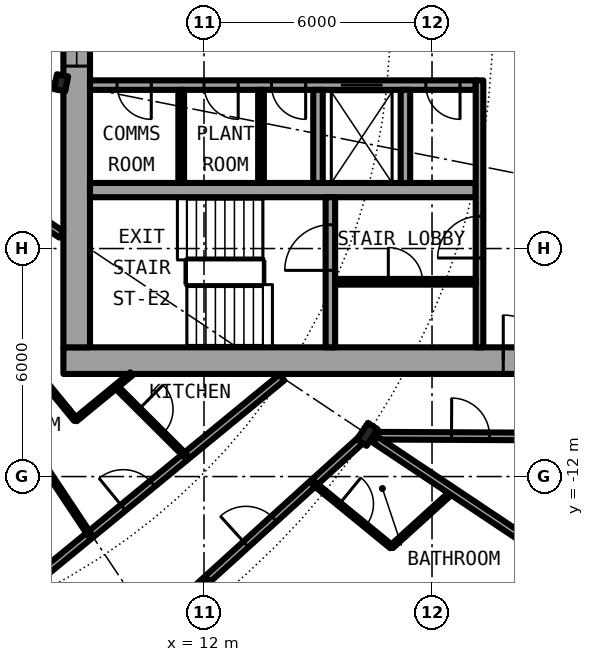
"""IFC4 building model, lengths in metres.
Left out: names, types, materials, properties, quantities, classifications, styles, units other than length and angle.
Written with IfcOpenShell. Run it as: python <this file> out.ifc"""

import sys

from ifc_helpers import new_model, si_unit, direction, frame, frame_2d, origin, origin_2d, place, context, subcontext, project, spatial, rectangle, i_section, extrude, element, fill, save


model = new_model("IFC4")
c1 = context("Model", 3, precision=1e-05, world=origin(), true_north=direction((0.0, 1.0)))
c2 = subcontext(c1, "Body", "Model", "MODEL_VIEW")
j1 = project(units=[si_unit("LENGTHUNIT", "METRE"), si_unit("PLANEANGLEUNIT", "RADIAN")], contexts=[c1])
p1 = place(None, origin())
s1 = spatial("IfcSite", under=j1, at=p1, CompositionType="ELEMENT")
p2 = place(p1, origin())
s2 = spatial("IfcBuilding", under=s1, at=p2, CompositionType="ELEMENT")
p3 = place(p2, frame((0.0, 0.0, 81.9)))
s3 = spatial("IfcBuildingStorey", under=s2, at=p3, CompositionType="ELEMENT", Elevation=81.9)
p4 = place(p3, frame((16.297, -10.889, 0.0), z_axis=(0.0, 0.0, 1.0), x_axis=(0.831469612303, -0.55557023302, 0.0)))
e1 = element("IfcColumn", 1, at=p4, inside=s3, PredefinedType="COLUMN", context=c2, shape_type="SweptSolid", body=[
    extrude(i_section(OverallWidth=0.306, OverallDepth=0.524, WebThickness=0.021, FlangeThickness=0.04, FilletRadius=0.027, at=origin_2d()), origin(), (0.0, 0.0, 1.0), 3.05),
])
p5 = place(p3, frame((8.239, -1.639, 0.0), z_axis=(0.0, 0.0, 1.0), x_axis=(0.980785280403, -0.195090322016, 0.0)))
e2 = element("IfcColumn", 2, at=p5, inside=s3, PredefinedType="COLUMN", context=c2, shape_type="SweptSolid", body=[
    extrude(i_section(OverallWidth=0.3, OverallDepth=0.4, WebThickness=0.013, FlangeThickness=0.024, FilletRadius=0.027, at=origin_2d()), origin(), (0.0, 0.0, 1.0), 3.05),
])
p6 = place(p3, frame((8.3, -8.95, 0.0), z_axis=(0.0, 0.0, 1.0), x_axis=(1.0, 0.0, 0.0)))
e3 = element("IfcWall", 3, at=p6, inside=s3, PredefinedType="SHEAR", context=c2, shape_type="SweptSolid", body=[
    extrude(rectangle(XDim=14.0, YDim=0.7, at=frame_2d((7.0, 0.0))), origin(), (0.0, 0.0, 1.0), 3.05),
])
p7 = place(p6, frame((11.575, 0.0, 0.0)))
e4 = element("IfcOpeningElement", 4, at=p7, cuts=e3, PredefinedType="OPENING", context=c2, shape_type="SweptSolid", body=[
    extrude(rectangle(XDim=1.2, YDim=2.3, at=frame_2d((0.6, 1.15))), frame((0.0, 0.36, 0.0), z_axis=(0.0, -1.0, 0.0), x_axis=(1.0, 0.0, 0.0)), (0.0, 0.0, 1.0), 0.72),
])
p8 = place(p3, frame((8.65, -8.6, 0.0), z_axis=(0.0, 0.0, 1.0), x_axis=(0.0, 1.0, 0.0)))
e5 = element("IfcWall", 5, at=p8, inside=s3, PredefinedType="SHEAR", context=c2, shape_type="SweptSolid", body=[
    extrude(rectangle(XDim=17.2, YDim=0.7, at=frame_2d((8.6, 0.0))), origin(), (0.0, 0.0, 1.0), 3.05),
])
p9 = place(p8, frame((7.4, 0.0, 0.1)))
e6 = element("IfcOpeningElement", 6, at=p9, cuts=e5, PredefinedType="OPENING", context=c2, shape_type="SweptSolid", body=[
    extrude(rectangle(XDim=2.4, YDim=2.2, at=frame_2d((1.2, 1.1))), frame((0.0, 0.36, 0.0), z_axis=(0.0, -1.0, 0.0), x_axis=(1.0, 0.0, 0.0)), (0.0, 0.0, 1.0), 0.72),
])
p10 = place(p3, frame((19.15, -1.7, 0.0), z_axis=(0.0, 0.0, 1.0), x_axis=(-1.0, 0.0, 0.0)))
e7 = element("IfcWall", 7, at=p10, inside=s3, PredefinedType="SHEAR", context=c2, shape_type="SweptSolid", body=[
    extrude(rectangle(XDim=10.15, YDim=0.25, at=frame_2d((5.075, 0.0))), origin(), (0.0, 0.0, 1.0), 3.05),
])
p11 = place(p10, frame((2.45, 0.0, 0.0)))
e8 = element("IfcOpeningElement", 8, at=p11, cuts=e7, PredefinedType="OPENING", context=c2, shape_type="SweptSolid", body=[
    extrude(rectangle(XDim=1.1, YDim=2.3, at=frame_2d((0.55, 1.15))), frame((0.0, 0.135, 0.0), z_axis=(0.0, -1.0, 0.0), x_axis=(1.0, 0.0, 0.0)), (0.0, 0.0, 1.0), 0.27),
])
p12 = place(p10, frame((8.538, 0.0, 0.0)))
e9 = element("IfcOpeningElement", 9, at=p12, cuts=e7, PredefinedType="OPENING", context=c2, shape_type="SweptSolid", body=[
    extrude(rectangle(XDim=0.9, YDim=2.3, at=frame_2d((0.45, 1.15))), frame((0.0, 0.135, 0.0), z_axis=(0.0, -1.0, 0.0), x_axis=(1.0, 0.0, 0.0)), (0.0, 0.0, 1.0), 0.27),
])
p13 = place(p10, frame((6.25, 0.0, 0.0)))
e10 = element("IfcOpeningElement", 10, at=p13, cuts=e7, PredefinedType="OPENING", context=c2, shape_type="SweptSolid", body=[
    extrude(rectangle(XDim=0.9, YDim=2.3, at=frame_2d((0.45, 1.15))), frame((0.0, 0.135, 0.0), z_axis=(0.0, -1.0, 0.0), x_axis=(1.0, 0.0, 0.0)), (0.0, 0.0, 1.0), 0.27),
])
p14 = place(p10, frame((4.475, 0.0, 0.0)))
e11 = element("IfcOpeningElement", 11, at=p14, cuts=e7, PredefinedType="OPENING", context=c2, shape_type="SweptSolid", body=[
    extrude(rectangle(XDim=0.9, YDim=2.3, at=frame_2d((0.45, 1.15))), frame((0.0, 0.135, 0.0), z_axis=(0.0, -1.0, 0.0), x_axis=(1.0, 0.0, 0.0)), (0.0, 0.0, 1.0), 0.27),
])
p15 = place(p10, frame((0.413, 0.0, 0.0)))
e12 = element("IfcOpeningElement", 12, at=p15, cuts=e7, PredefinedType="OPENING", context=c2, shape_type="SweptSolid", body=[
    extrude(rectangle(XDim=0.9, YDim=2.3, at=frame_2d((0.45, 1.15))), frame((0.0, 0.135, 0.0), z_axis=(0.0, -1.0, 0.0), x_axis=(1.0, 0.0, 0.0)), (0.0, 0.0, 1.0), 0.27),
])
p16 = place(p3, frame((9.0, -4.462, 0.0), z_axis=(0.0, 0.0, 1.0), x_axis=(1.0, 0.0, 0.0)))
e13 = element("IfcWall", 13, at=p16, inside=s3, PredefinedType="SHEAR", context=c2, shape_type="SweptSolid", body=[
    extrude(rectangle(XDim=10.15, YDim=0.375, at=frame_2d((5.075, 0.0))), origin(), (0.0, 0.0, 1.0), 3.05),
])
p17 = place(p3, frame((15.325, -8.6, 0.0), z_axis=(0.0, 0.0, 1.0), x_axis=(0.0, 1.0, 0.0)))
e14 = element("IfcWall", 14, at=p17, inside=s3, PredefinedType="SHEAR", context=c2, shape_type="SweptSolid", body=[
    extrude(rectangle(XDim=3.95, YDim=0.25, at=frame_2d((1.975, 0.0))), origin(), (0.0, 0.0, 1.0), 3.05),
])
p18 = place(p17, frame((2.025, 0.0, 0.0)))
e15 = element("IfcOpeningElement", 15, at=p18, cuts=e14, PredefinedType="OPENING", context=c2, shape_type="SweptSolid", body=[
    extrude(rectangle(XDim=1.2, YDim=2.3, at=frame_2d((0.6, 1.15))), frame((0.0, 0.135, 0.0), z_axis=(0.0, -1.0, 0.0), x_axis=(1.0, 0.0, 0.0)), (0.0, 0.0, 1.0), 0.27),
])
for number, where, z_axis, x_axis in (
    (16, (15.0, -1.825, 0.0), (0.0, 0.0, 1.0), (0.0, -1.0, 0.0)),
    (17, (17.3, -1.825, 0.0), (0.0, 0.0, 1.0), (0.0, -1.0, 0.0)),
):
    element("IfcWall", number, at=place(p3, frame(where, z_axis=z_axis, x_axis=x_axis)), inside=s3, PredefinedType="SOLIDWALL", context=c2, shape_type="SweptSolid", body=[
        extrude(rectangle(XDim=2.45, YDim=0.25, at=frame_2d((1.225, 0.0))), origin(), (0.0, 0.0, 1.0), 2.7),
    ])
p19 = place(p3, frame((19.25, -8.6, 0.0), z_axis=(0.0, 0.0, 1.0), x_axis=(0.0, 1.0, 0.0)))
e18 = element("IfcWall", 18, at=p19, inside=s3, PredefinedType="SOLIDWALL", context=c2, shape_type="SweptSolid", body=[
    extrude(rectangle(XDim=7.025, YDim=0.2, at=frame_2d((3.513, 0.0))), origin(), (0.0, 0.0, 1.0), 2.7),
])
p20 = place(p19, frame((2.35, 0.0, 0.0)))
e19 = element("IfcOpeningElement", 19, at=p20, cuts=e18, PredefinedType="OPENING", context=c2, shape_type="SweptSolid", body=[
    extrude(rectangle(XDim=1.1, YDim=2.3, at=frame_2d((0.55, 1.15))), frame((0.0, 0.11, 0.0), z_axis=(0.0, -1.0, 0.0), x_axis=(1.0, 0.0, 0.0)), (0.0, 0.0, 1.0), 0.22),
])
for number, where, z_axis, x_axis in (
    (20, (11.4, -1.825, 0.0), (0.0, 0.0, 1.0), (0.0, -1.0, 0.0)),
    (21, (13.5, -1.825, 0.0), (0.0, 0.0, 1.0), (0.0, -1.0, 0.0)),
):
    element("IfcWall", number, at=place(p3, frame(where, z_axis=z_axis, x_axis=x_axis)), inside=s3, PredefinedType="PARTITIONING", context=c2, shape_type="SweptSolid", body=[
        extrude(rectangle(XDim=2.45, YDim=0.15, at=frame_2d((1.225, 0.0))), origin(), (0.0, 0.0, 1.0), 2.7),
    ])
p21 = place(p3, frame((15.45, -6.875, 0.0), z_axis=(0.0, 0.0, 1.0), x_axis=(1.0, 0.0, 0.0)))
e22 = element("IfcWall", 22, at=p21, inside=s3, PredefinedType="PARTITIONING", context=c2, shape_type="SweptSolid", body=[
    extrude(rectangle(XDim=3.7, YDim=0.15, at=frame_2d((1.85, 0.0))), origin(), (0.0, 0.0, 1.0), 2.7),
])
p22 = place(p21, frame((1.4, 0.0, 0.0)))
e23 = element("IfcOpeningElement", 23, at=p22, cuts=e22, PredefinedType="OPENING", context=c2, shape_type="SweptSolid", body=[
    extrude(rectangle(XDim=0.9, YDim=2.3, at=frame_2d((0.45, 1.15))), frame((0.0, 0.085, 0.0), z_axis=(0.0, -1.0, 0.0), x_axis=(1.0, 0.0, 0.0)), (0.0, 0.0, 1.0), 0.17),
])
p23 = place(p3, frame((16.936, -13.845, 0.0), z_axis=(0.0, 0.0, 1.0), x_axis=(0.740836325503, 0.671685595212, 0.0)))
e24 = element("IfcWall", 24, at=p23, inside=s3, PredefinedType="PARTITIONING", context=c2, shape_type="SweptSolid", body=[
    extrude(rectangle(XDim=2.168, YDim=0.1, at=frame_2d((1.084, 0.0))), origin(), (0.0, 0.0, 1.0), 2.7),
])
p24 = place(p3, frame((9.239, -17.286, 0.0), z_axis=(0.0, 0.0, 1.0), x_axis=(0.740909940942, 0.671604392044, 0.0)))
e25 = element("IfcWall", 25, at=p24, inside=s3, PredefinedType="PARTITIONING", context=c2, shape_type="SweptSolid", body=[
    extrude(rectangle(XDim=9.367, YDim=0.2, at=frame_2d((4.683, 0.0))), origin(), (0.0, 0.0, 1.0), 2.38),
])
p25 = place(p24, frame((5.215, 0.0, 0.0)))
e26 = element("IfcOpeningElement", 26, at=p25, cuts=e25, PredefinedType="OPENING", context=c2, shape_type="SweptSolid", body=[
    extrude(rectangle(XDim=1.0, YDim=2.3, at=frame_2d((0.5, 1.15))), frame((0.0, 0.11, 0.0), z_axis=(0.0, -1.0, 0.0), x_axis=(1.0, 0.0, 0.0)), (0.0, 0.0, 1.0), 0.22),
])
p26 = place(p3, frame((6.467, -15.614, 0.0), z_axis=(0.0, 0.0, 1.0), x_axis=(0.773074935257, 0.634314704605, 0.0)))
e27 = element("IfcWall", 27, at=p26, inside=s3, PredefinedType="PARTITIONING", context=c2, shape_type="SweptSolid", body=[
    extrude(rectangle(XDim=9.809, YDim=0.2, at=frame_2d((4.904, 0.0))), origin(), (0.0, 0.0, 1.0), 2.7),
])
p27 = place(p26, frame((4.407, 0.0, 0.0)))
e28 = element("IfcOpeningElement", 28, at=p27, cuts=e27, PredefinedType="OPENING", context=c2, shape_type="SweptSolid", body=[
    extrude(rectangle(XDim=1.0, YDim=2.3, at=frame_2d((0.5, 1.15))), frame((0.0, 0.11, 0.0), z_axis=(0.0, -1.0, 0.0), x_axis=(1.0, 0.0, 0.0)), (0.0, 0.0, 1.0), 0.22),
])
p28 = place(p3, frame((8.62, -10.505, 0.0), z_axis=(0.0, 0.0, 1.0), x_axis=(0.772957368531, 0.6344579627, 0.0)))
e29 = element("IfcWall", 29, at=p28, inside=s3, PredefinedType="PARTITIONING", context=c2, shape_type="SweptSolid", body=[
    extrude(rectangle(XDim=1.906, YDim=0.1, at=frame_2d((0.953, 0.0))), origin(), (0.0, 0.0, 1.0), 2.7),
])
p29 = place(p3, frame((16.588, -10.925, 0.0), z_axis=(0.0, 0.0, 1.0), x_axis=(0.999988019025, -0.004895079807, 0.0)))
e30 = element("IfcWall", 30, at=p29, inside=s3, PredefinedType="PARTITIONING", context=c2, shape_type="SweptSolid", body=[
    extrude(rectangle(XDim=5.087, YDim=0.2, at=frame_2d((2.543, 0.0))), origin(), (0.0, 0.0, 1.0), 2.7),
])
p30 = place(p29, frame((1.925, 0.0, 0.0)))
e31 = element("IfcOpeningElement", 31, at=p30, cuts=e30, PredefinedType="OPENING", context=c2, shape_type="SweptSolid", body=[
    extrude(rectangle(XDim=1.0, YDim=2.3, at=frame_2d((0.5, 1.15))), frame((0.0, 0.11, 0.0), z_axis=(0.0, -1.0, 0.0), x_axis=(1.0, 0.0, 0.0)), (0.0, 0.0, 1.0), 0.22),
])
p31 = place(p3, frame((6.513, -4.472, 0.0), z_axis=(0.0, 0.0, 1.0), x_axis=(0.831382204863, -0.555701025225, 0.0)))
e32 = element("IfcWall", 32, at=p31, inside=s3, PredefinedType="PARTITIONING", context=c2, shape_type="SweptSolid", body=[
    extrude(rectangle(XDim=2.082, YDim=0.2, at=frame_2d((1.041, 0.0))), origin(), (0.0, 0.0, 1.0), 2.7),
])
p32 = place(p3, frame((4.898, -5.968, 0.0), z_axis=(0.0, 0.0, 1.0), x_axis=(0.634358693064, -0.773038840249, 0.0)))
e33 = element("IfcWall", 33, at=p32, inside=s3, PredefinedType="PARTITIONING", context=c2, shape_type="SweptSolid", body=[
    extrude(rectangle(XDim=5.868, YDim=0.1, at=frame_2d((2.934, 0.0))), origin(), (0.0, 0.0, 1.0), 2.7),
])
p33 = place(p32, frame((2.484, 0.0, 0.0)))
e34 = element("IfcOpeningElement", 34, at=p33, cuts=e33, PredefinedType="OPENING", context=c2, shape_type="SweptSolid", body=[
    extrude(rectangle(XDim=0.9, YDim=2.3, at=frame_2d((0.45, 1.15))), frame((0.0, 0.06, 0.0), z_axis=(0.0, -1.0, 0.0), x_axis=(1.0, 0.0, 0.0)), (0.0, 0.0, 1.0), 0.12),
])
p34 = place(p3, frame((7.558, -11.376, 0.0), z_axis=(0.0, 0.0, 1.0), x_axis=(0.553615197403, -0.83277260594, 0.0)))
e35 = element("IfcWall", 35, at=p34, inside=s3, PredefinedType="PARTITIONING", context=c2, shape_type="SweptSolid", body=[
    extrude(rectangle(XDim=2.597, YDim=0.1, at=frame_2d((1.299, 0.0))), origin(), (0.0, 0.0, 1.0), 2.7),
])
p35 = place(p3, frame((9.683, -9.632, 0.0), z_axis=(0.0, 0.0, 1.0), x_axis=(0.708796844581, -0.705412668665, 0.0)))
e36 = element("IfcWall", 36, at=p35, inside=s3, PredefinedType="PARTITIONING", context=c2, shape_type="SweptSolid", body=[
    extrude(rectangle(XDim=2.597, YDim=0.1, at=frame_2d((1.299, 0.0))), origin(), (0.0, 0.0, 1.0), 2.7),
])
p36 = place(p35, frame((0.849, 0.0, 0.0)))
e37 = element("IfcOpeningElement", 37, at=p36, cuts=e36, PredefinedType="OPENING", context=c2, shape_type="SweptSolid", body=[
    extrude(rectangle(XDim=0.9, YDim=2.3, at=frame_2d((0.45, 1.15))), frame((0.0, 0.06, 0.0), z_axis=(0.0, -1.0, 0.0), x_axis=(1.0, 0.0, 0.0)), (0.0, 0.0, 1.0), 0.12),
])
p37 = place(p3, frame((12.062, -14.727, 0.0), z_axis=(0.0, 0.0, 1.0), x_axis=(0.633664062855, -0.773608334654, 0.0)))
e38 = element("IfcWall", 38, at=p37, inside=s3, PredefinedType="PARTITIONING", context=c2, shape_type="SweptSolid", body=[
    extrude(rectangle(XDim=8.138, YDim=0.1, at=frame_2d((4.069, 0.0))), origin(), (0.0, 0.0, 1.0), 2.7),
])
p38 = place(p37, frame((0.861, 0.0, 0.0)))
e39 = element("IfcOpeningElement", 39, at=p38, cuts=e38, PredefinedType="OPENING", context=c2, shape_type="SweptSolid", body=[
    extrude(rectangle(XDim=0.9, YDim=2.3, at=frame_2d((0.45, 1.15))), frame((0.0, 0.06, 0.0), z_axis=(0.0, -1.0, 0.0), x_axis=(1.0, 0.0, 0.0)), (0.0, 0.0, 1.0), 0.12),
])
p39 = place(p37, frame((4.931, 0.0, 0.0)))
e40 = element("IfcOpeningElement", 40, at=p39, cuts=e38, PredefinedType="OPENING", context=c2, shape_type="SweptSolid", body=[
    extrude(rectangle(XDim=0.9, YDim=2.3, at=frame_2d((0.45, 1.15))), frame((0.0, 0.06, 0.0), z_axis=(0.0, -1.0, 0.0), x_axis=(1.0, 0.0, 0.0)), (0.0, 0.0, 1.0), 0.12),
])
p40 = place(p3, frame((14.882, -12.171, 0.0), z_axis=(0.0, 0.0, 1.0), x_axis=(0.774162545943, -0.632986850147, 0.0)))
e41 = element("IfcWall", 41, at=p40, inside=s3, PredefinedType="PARTITIONING", context=c2, shape_type="SweptSolid", body=[
    extrude(rectangle(XDim=2.649, YDim=0.1, at=frame_2d((1.325, 0.0))), origin(), (0.0, 0.0, 1.0), 2.7),
])
p41 = place(p40, frame((0.875, 0.0, 0.0)))
e42 = element("IfcOpeningElement", 42, at=p41, cuts=e41, PredefinedType="OPENING", context=c2, shape_type="SweptSolid", body=[
    extrude(rectangle(XDim=0.9, YDim=2.3, at=frame_2d((0.45, 1.15))), frame((0.0, 0.06, 0.0), z_axis=(0.0, -1.0, 0.0), x_axis=(1.0, 0.0, 0.0)), (0.0, 0.0, 1.0), 0.12),
])
p42 = place(p3, frame((16.515, -11.035, 0.0), z_axis=(0.0, 0.0, 1.0), x_axis=(0.831505405283, -0.555516661303, 0.0)))
e43 = element("IfcWall", 43, at=p42, inside=s3, PredefinedType="PARTITIONING", context=c2, shape_type="SweptSolid", body=[
    extrude(rectangle(XDim=7.312, YDim=0.2, at=frame_2d((3.656, 0.0))), origin(), (0.0, 0.0, 1.0), 2.7),
])
p43 = place(p11, origin())
e44 = element("IfcDoor", 44, at=p43, inside=s3, OperationType="DOUBLE_DOOR_SLIDING", PredefinedType="DOOR", context=c2, shape_type="SweptSolid", body=[
    extrude(rectangle(XDim=1.1, YDim=2.3, at=frame_2d((0.55, 1.15))), frame((0.0, 0.025, 0.0), z_axis=(0.0, -1.0, 0.0), x_axis=(1.0, 0.0, 0.0)), (0.0, 0.0, 1.0), 0.05),
])
fill(e8, e44)
p44 = place(p12, origin())
e45 = element("IfcDoor", 45, at=p44, inside=s3, OperationType="SINGLE_SWING_LEFT", PredefinedType="DOOR", context=c2, shape_type="SweptSolid", body=[
    extrude(rectangle(XDim=0.9, YDim=2.3, at=frame_2d((0.45, 1.15))), frame((0.0, 0.025, 0.0), z_axis=(0.0, -1.0, 0.0), x_axis=(1.0, 0.0, 0.0)), (0.0, 0.0, 1.0), 0.05),
])
fill(e9, e45)
p45 = place(p13, origin())
e46 = element("IfcDoor", 46, at=p45, inside=s3, OperationType="SINGLE_SWING_LEFT", PredefinedType="DOOR", context=c2, shape_type="SweptSolid", body=[
    extrude(rectangle(XDim=0.9, YDim=2.3, at=frame_2d((0.45, 1.15))), frame((0.0, 0.025, 0.0), z_axis=(0.0, -1.0, 0.0), x_axis=(1.0, 0.0, 0.0)), (0.0, 0.0, 1.0), 0.05),
])
fill(e10, e46)
p46 = place(p14, origin())
e47 = element("IfcDoor", 47, at=p46, inside=s3, OperationType="SINGLE_SWING_RIGHT", PredefinedType="DOOR", context=c2, shape_type="SweptSolid", body=[
    extrude(rectangle(XDim=0.9, YDim=2.3, at=frame_2d((0.45, 1.15))), frame((0.0, 0.025, 0.0), z_axis=(0.0, -1.0, 0.0), x_axis=(1.0, 0.0, 0.0)), (0.0, 0.0, 1.0), 0.05),
])
fill(e11, e47)
p47 = place(p15, origin())
e48 = element("IfcDoor", 48, at=p47, inside=s3, OperationType="SINGLE_SWING_RIGHT", PredefinedType="DOOR", context=c2, shape_type="SweptSolid", body=[
    extrude(rectangle(XDim=0.9, YDim=2.3, at=frame_2d((0.45, 1.15))), frame((0.0, 0.025, 0.0), z_axis=(0.0, -1.0, 0.0), x_axis=(1.0, 0.0, 0.0)), (0.0, 0.0, 1.0), 0.05),
])
fill(e12, e48)
p48 = place(p22, origin())
e49 = element("IfcDoor", 49, at=p48, inside=s3, OperationType="SINGLE_SWING_LEFT", PredefinedType="DOOR", context=c2, shape_type="SweptSolid", body=[
    extrude(rectangle(XDim=0.9, YDim=2.3, at=frame_2d((0.45, 1.15))), frame((0.0, 0.025, 0.0), z_axis=(0.0, -1.0, 0.0), x_axis=(1.0, 0.0, 0.0)), (0.0, 0.0, 1.0), 0.05),
])
fill(e23, e49)
p49 = place(p18, origin())
e50 = element("IfcDoor", 50, at=p49, inside=s3, OperationType="SINGLE_SWING_LEFT", PredefinedType="DOOR", context=c2, shape_type="SweptSolid", body=[
    extrude(rectangle(XDim=1.2, YDim=2.3, at=frame_2d((0.6, 1.15))), frame((0.0, 0.025, 0.0), z_axis=(0.0, -1.0, 0.0), x_axis=(1.0, 0.0, 0.0)), (0.0, 0.0, 1.0), 0.05),
])
fill(e15, e50)
p50 = place(p20, origin())
e51 = element("IfcDoor", 51, at=p50, inside=s3, OperationType="SINGLE_SWING_RIGHT", PredefinedType="DOOR", context=c2, shape_type="SweptSolid", body=[
    extrude(rectangle(XDim=1.1, YDim=2.3, at=frame_2d((0.55, 1.15))), frame((0.0, 0.025, 0.0), z_axis=(0.0, -1.0, 0.0), x_axis=(1.0, 0.0, 0.0)), (0.0, 0.0, 1.0), 0.05),
])
fill(e19, e51)
p51 = place(p7, origin())
e52 = element("IfcDoor", 52, at=p51, inside=s3, OperationType="SINGLE_SWING_LEFT", PredefinedType="DOOR", context=c2, shape_type="SweptSolid", body=[
    extrude(rectangle(XDim=1.2, YDim=2.3, at=frame_2d((0.6, 1.15))), frame((0.0, 0.025, 0.0), z_axis=(0.0, -1.0, 0.0), x_axis=(1.0, 0.0, 0.0)), (0.0, 0.0, 1.0), 0.05),
])
fill(e4, e52)
p52 = place(p9, origin())
e53 = element("IfcWindow", 53, at=p52, inside=s3, PartitioningType="SINGLE_PANEL", PredefinedType="WINDOW", context=c2, shape_type="SweptSolid", body=[
    extrude(rectangle(XDim=2.4, YDim=2.2, at=frame_2d((1.2, 1.1))), frame((0.0, 0.03, 0.0), z_axis=(0.0, -1.0, 0.0), x_axis=(1.0, 0.0, 0.0)), (0.0, 0.0, 1.0), 0.06),
])
fill(e6, e53)
p53 = place(p25, origin())
e54 = element("IfcDoor", 54, at=p53, inside=s3, OperationType="SINGLE_SWING_RIGHT", PredefinedType="DOOR", context=c2, shape_type="SweptSolid", body=[
    extrude(rectangle(XDim=1.0, YDim=2.3, at=frame_2d((0.5, 1.15))), frame((0.0, 0.025, 0.0), z_axis=(0.0, -1.0, 0.0), x_axis=(1.0, 0.0, 0.0)), (0.0, 0.0, 1.0), 0.05),
])
fill(e26, e54)
p54 = place(p41, origin())
e55 = element("IfcDoor", 55, at=p54, inside=s3, OperationType="SINGLE_SWING_RIGHT", PredefinedType="DOOR", context=c2, shape_type="SweptSolid", body=[
    extrude(rectangle(XDim=0.9, YDim=2.3, at=frame_2d((0.45, 1.15))), frame((0.0, 0.025, 0.0), z_axis=(0.0, -1.0, 0.0), x_axis=(1.0, 0.0, 0.0)), (0.0, 0.0, 1.0), 0.05),
])
fill(e42, e55)
p55 = place(p27, origin())
e56 = element("IfcDoor", 56, at=p55, inside=s3, OperationType="SINGLE_SWING_RIGHT", PredefinedType="DOOR", context=c2, shape_type="SweptSolid", body=[
    extrude(rectangle(XDim=1.0, YDim=2.3, at=frame_2d((0.5, 1.15))), frame((0.0, 0.025, 0.0), z_axis=(0.0, -1.0, 0.0), x_axis=(1.0, 0.0, 0.0)), (0.0, 0.0, 1.0), 0.05),
])
fill(e28, e56)
p56 = place(p36, origin())
e57 = element("IfcDoor", 57, at=p56, inside=s3, OperationType="SINGLE_SWING_RIGHT", PredefinedType="DOOR", context=c2, shape_type="SweptSolid", body=[
    extrude(rectangle(XDim=0.9, YDim=2.3, at=frame_2d((0.45, 1.15))), frame((0.0, 0.025, 0.0), z_axis=(0.0, -1.0, 0.0), x_axis=(1.0, 0.0, 0.0)), (0.0, 0.0, 1.0), 0.05),
])
fill(e37, e57)
p57 = place(p30, origin())
e58 = element("IfcDoor", 58, at=p57, inside=s3, OperationType="SINGLE_SWING_LEFT", PredefinedType="DOOR", context=c2, shape_type="SweptSolid", body=[
    extrude(rectangle(XDim=1.0, YDim=2.3, at=frame_2d((0.5, 1.15))), frame((0.0, 0.025, 0.0), z_axis=(0.0, -1.0, 0.0), x_axis=(1.0, 0.0, 0.0)), (0.0, 0.0, 1.0), 0.05),
])
fill(e31, e58)
save(model, sys.argv[1])
